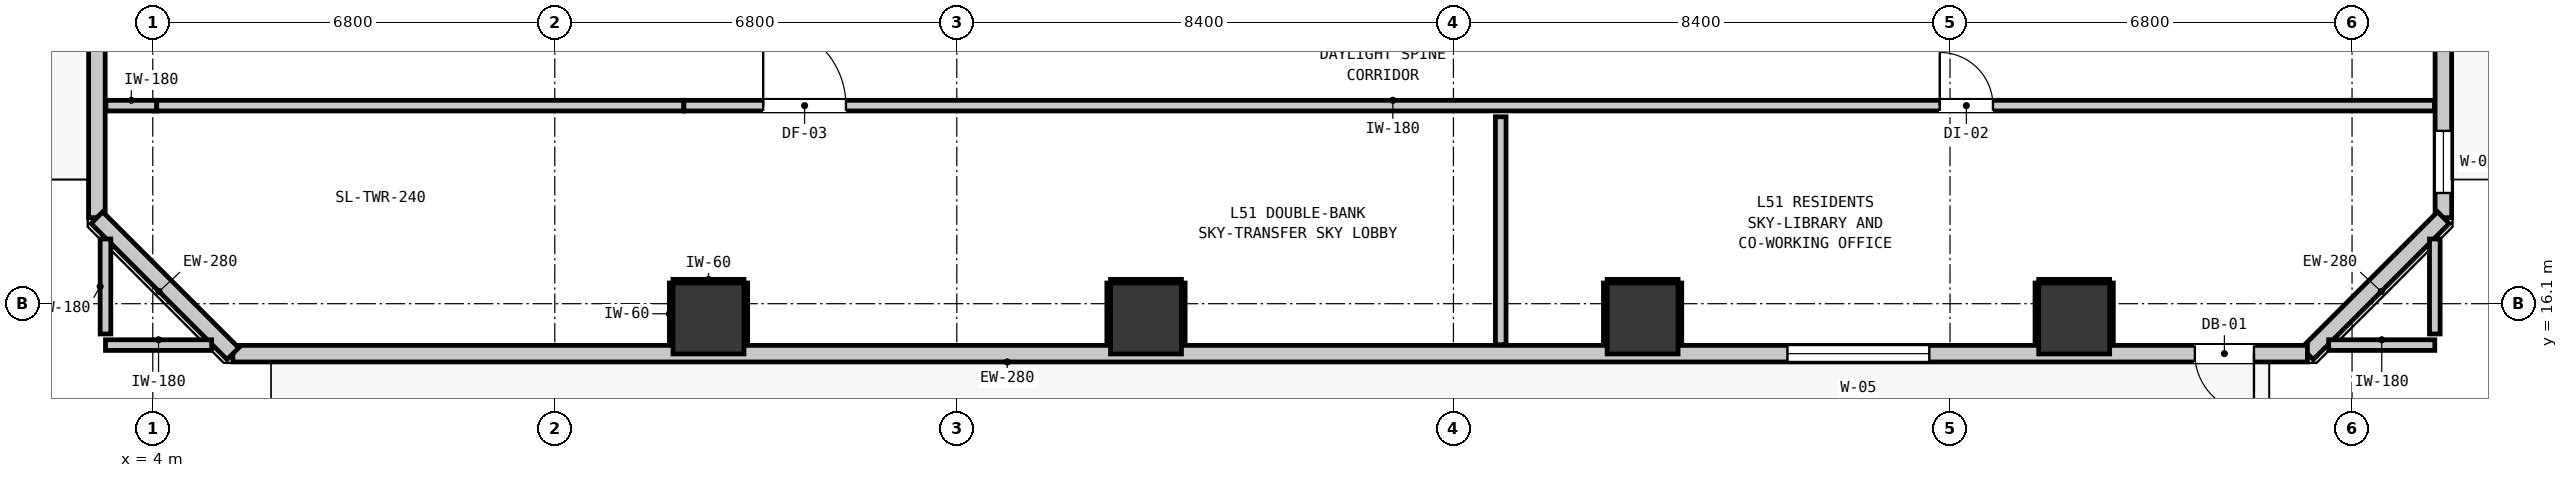
"""IFC4 building model, lengths in metres.
Left out: names, types, materials, properties, quantities, classifications, styles, units other than length and angle.
Written with IfcOpenShell. Run it as: python <this file> out.ifc"""

import sys

from ifc_helpers import new_model, si_unit, direction, frame, frame_2d, origin, origin_2d, place, context, subcontext, project, spatial, rectangle, extrude, element, fill, save


model = new_model("IFC4")
c1 = context("Model", 3, precision=1e-05, world=origin(), true_north=direction((0.0, 1.0)))
c2 = subcontext(c1, "Body", "Model", "MODEL_VIEW")
j1 = project(units=[si_unit("LENGTHUNIT", "METRE"), si_unit("PLANEANGLEUNIT", "RADIAN")], contexts=[c1])
p1 = place(None, origin())
s1 = spatial("IfcSite", under=j1, at=p1, CompositionType="ELEMENT")
p2 = place(p1, origin())
s2 = spatial("IfcBuilding", under=s1, at=p2, CompositionType="ELEMENT")
p3 = place(p2, frame((0.0, 0.0, 176.88)))
s3 = spatial("IfcBuildingStorey", under=s2, at=p3, CompositionType="ELEMENT", Elevation=176.88)
for number, where, z_axis, x_axis in (
    (1, (13.4, 15.85, 0.0), (0.0, 0.0, 1.0), (1.0, 0.0, 0.0)),
    (2, (20.8, 15.85, 0.0), (0.0, 0.0, 1.0), (1.0, 0.0, 0.0)),
    (3, (29.2, 15.85, 0.0), (0.0, 0.0, 1.0), (1.0, 0.0, 0.0)),
    (4, (36.5, 15.85, 0.0), (0.0, 0.0, 1.0), (1.0, 0.0, 0.0)),
):
    element("IfcColumn", number, at=place(p3, frame(where, z_axis=z_axis, x_axis=x_axis)), inside=s3, PredefinedType="COLUMN", context=c2, shape_type="SweptSolid", body=[
        extrude(rectangle(XDim=1.2, YDim=1.2, at=origin_2d()), origin(), (0.0, 0.0, 1.0), 3.32),
    ])
p4 = place(p3, frame((3.055, 17.555, 0.0), z_axis=(0.0, 0.0, 1.0), x_axis=(0.0, 1.0, 0.0)))
e5 = element("IfcWall", 5, at=p4, inside=s3, PredefinedType="STANDARD", context=c2, shape_type="SweptSolid", body=[
    extrude(rectangle(XDim=32.29, YDim=0.28, at=frame_2d((16.145, 0.0))), origin(), (0.0, 0.0, 1.0), 3.08),
])
p5 = place(p4, frame((29.684, 0.0, 0.0)))
e6 = element("IfcOpeningElement", 6, at=p5, cuts=e5, PredefinedType="OPENING", context=c2, shape_type="SweptSolid", body=[
    extrude(rectangle(XDim=1.0, YDim=2.15, at=frame_2d((0.5, 1.075))), frame((0.0, 0.15, 0.0), z_axis=(0.0, -1.0, 0.0), x_axis=(1.0, 0.0, 0.0)), (0.0, 0.0, 1.0), 0.3),
])
p6 = place(p4, frame((31.092, 0.0, 0.85)))
e7 = element("IfcOpeningElement", 7, at=p6, cuts=e5, PredefinedType="OPENING", context=c2, shape_type="SweptSolid", body=[
    extrude(rectangle(XDim=0.9, YDim=1.5, at=frame_2d((0.45, 0.75))), frame((0.0, 0.15, 0.0), z_axis=(0.0, -1.0, 0.0), x_axis=(1.0, 0.0, 0.0)), (0.0, 0.0, 1.0), 0.3),
])
p7 = place(p3, frame((42.745, 49.845, 0.0), z_axis=(0.0, 0.0, 1.0), x_axis=(0.0, -1.0, 0.0)))
e8 = element("IfcWall", 8, at=p7, inside=s3, PredefinedType="STANDARD", context=c2, shape_type="SweptSolid", body=[
    extrude(rectangle(XDim=32.29, YDim=0.28, at=frame_2d((16.145, 0.0))), origin(), (0.0, 0.0, 1.0), 3.08),
])
p8 = place(p7, frame((0.904, 0.0, 0.0)))
e9 = element("IfcOpeningElement", 9, at=p8, cuts=e8, PredefinedType="OPENING", context=c2, shape_type="SweptSolid", body=[
    extrude(rectangle(XDim=1.0, YDim=2.15, at=frame_2d((0.5, 1.075))), frame((0.0, 0.15, 0.0), z_axis=(0.0, -1.0, 0.0), x_axis=(1.0, 0.0, 0.0)), (0.0, 0.0, 1.0), 0.3),
])
p9 = place(p7, frame((30.822, 0.0, 0.85)))
e10 = element("IfcOpeningElement", 10, at=p9, cuts=e8, PredefinedType="OPENING", context=c2, shape_type="SweptSolid", body=[
    extrude(rectangle(XDim=1.05, YDim=1.65, at=frame_2d((0.525, 0.825))), frame((0.0, 0.15, 0.0), z_axis=(0.0, -1.0, 0.0), x_axis=(1.0, 0.0, 0.0)), (0.0, 0.0, 1.0), 0.3),
])
p10 = place(p7, frame((13.595, 0.0, 0.85)))
e11 = element("IfcOpeningElement", 11, at=p10, cuts=e8, PredefinedType="OPENING", context=c2, shape_type="SweptSolid", body=[
    extrude(rectangle(XDim=2.4, YDim=1.95, at=frame_2d((1.2, 0.975))), frame((0.0, 0.15, 0.0), z_axis=(0.0, -1.0, 0.0), x_axis=(1.0, 0.0, 0.0)), (0.0, 0.0, 1.0), 0.3),
])
p11 = place(p3, frame((42.745, 17.555, 0.0), z_axis=(0.0, 0.0, 1.0), x_axis=(-0.707106781187, -0.707106781187, 0.0)))
e12 = element("IfcWall", 12, at=p11, inside=s3, PredefinedType="STANDARD", context=c2, shape_type="SweptSolid", body=[
    extrude(rectangle(XDim=3.253, YDim=0.28, at=frame_2d((1.626, 0.0))), origin(), (0.0, 0.0, 1.0), 3.08),
])
p12 = place(p3, frame((40.445, 15.255, 0.0), z_axis=(0.0, 0.0, 1.0), x_axis=(-1.0, 0.0, 0.0)))
e13 = element("IfcWall", 13, at=p12, inside=s3, PredefinedType="STANDARD", context=c2, shape_type="SweptSolid", body=[
    extrude(rectangle(XDim=35.09, YDim=0.28, at=frame_2d((17.545, 0.0))), origin(), (0.0, 0.0, 1.0), 3.08),
])
p13 = place(p12, frame((0.904, 0.0, 0.0)))
e14 = element("IfcOpeningElement", 14, at=p13, cuts=e13, PredefinedType="OPENING", context=c2, shape_type="SweptSolid", body=[
    extrude(rectangle(XDim=1.0, YDim=2.15, at=frame_2d((0.5, 1.075))), frame((0.0, 0.15, 0.0), z_axis=(0.0, -1.0, 0.0), x_axis=(1.0, 0.0, 0.0)), (0.0, 0.0, 1.0), 0.3),
])
p14 = place(p12, frame((6.395, 0.0, 0.85)))
e15 = element("IfcOpeningElement", 15, at=p14, cuts=e13, PredefinedType="OPENING", context=c2, shape_type="SweptSolid", body=[
    extrude(rectangle(XDim=2.4, YDim=1.95, at=frame_2d((1.2, 0.975))), frame((0.0, 0.15, 0.0), z_axis=(0.0, -1.0, 0.0), x_axis=(1.0, 0.0, 0.0)), (0.0, 0.0, 1.0), 0.3),
])
p15 = place(p3, frame((5.355, 15.255, 0.0), z_axis=(0.0, 0.0, 1.0), x_axis=(-0.707106781187, 0.707106781187, 0.0)))
e16 = element("IfcWall", 16, at=p15, inside=s3, PredefinedType="STANDARD", context=c2, shape_type="SweptSolid", body=[
    extrude(rectangle(XDim=3.253, YDim=0.28, at=frame_2d((1.626, 0.0))), origin(), (0.0, 0.0, 1.0), 3.08),
])
for number, where, z_axis, x_axis in (
    (17, (3.2, 15.4, 0.0), (0.0, 0.0, 1.0), (1.0, 0.0, 0.0)),
    (18, (40.805, 15.4, 0.0), (0.0, 0.0, 1.0), (1.0, 0.0, 0.0)),
):
    element("IfcWall", number, at=place(p3, frame(where, z_axis=z_axis, x_axis=x_axis)), inside=s3, PredefinedType="PARTITIONING", context=c2, shape_type="SweptSolid", body=[
        extrude(rectangle(XDim=1.795, YDim=0.18, at=frame_2d((0.897, 0.0))), origin(), (0.0, 0.0, 1.0), 3.08),
    ])
p16 = place(p3, frame((3.207, 19.45, 0.0), z_axis=(0.0, 0.0, 1.0), x_axis=(1.0, 0.0, 0.0)))
e19 = element("IfcWall", 19, at=p16, inside=s3, PredefinedType="PARTITIONING", context=c2, shape_type="SweptSolid", body=[
    extrude(rectangle(XDim=0.86, YDim=0.18, at=frame_2d((0.43, 0.0))), origin(), (0.0, 0.0, 1.0), 3.08),
])
p17 = place(p3, frame((4.067, 19.45, 0.0), z_axis=(0.0, 0.0, 1.0), x_axis=(1.0, 0.0, 0.0)))
e20 = element("IfcWall", 20, at=p17, inside=s3, PredefinedType="PARTITIONING", context=c2, shape_type="SweptSolid", body=[
    extrude(rectangle(XDim=8.916, YDim=0.18, at=frame_2d((4.458, 0.0))), origin(), (0.0, 0.0, 1.0), 2.565),
])
p18 = place(p3, frame((12.983, 19.45, 0.0), z_axis=(0.0, 0.0, 1.0), x_axis=(1.0, 0.0, 0.0)))
e21 = element("IfcWall", 21, at=p18, inside=s3, PredefinedType="PARTITIONING", context=c2, shape_type="SweptSolid", body=[
    extrude(rectangle(XDim=29.61, YDim=0.18, at=frame_2d((14.805, 0.0))), origin(), (0.0, 0.0, 1.0), 3.08),
])
p19 = place(p18, frame((1.342, 0.0, 0.0)))
e22 = element("IfcOpeningElement", 22, at=p19, cuts=e21, PredefinedType="OPENING", context=c2, shape_type="SweptSolid", body=[
    extrude(rectangle(XDim=1.4, YDim=2.15, at=frame_2d((0.7, 1.075))), frame((0.0, 0.1, 0.0), z_axis=(0.0, -1.0, 0.0), x_axis=(1.0, 0.0, 0.0)), (0.0, 0.0, 1.0), 0.2),
])
p20 = place(p18, frame((21.243, 0.0, 0.0)))
e23 = element("IfcOpeningElement", 23, at=p20, cuts=e21, PredefinedType="OPENING", context=c2, shape_type="SweptSolid", body=[
    extrude(rectangle(XDim=0.9, YDim=2.1, at=frame_2d((0.45, 1.05))), frame((0.0, 0.1, 0.0), z_axis=(0.0, -1.0, 0.0), x_axis=(1.0, 0.0, 0.0)), (0.0, 0.0, 1.0), 0.2),
])
p21 = place(p3, frame((3.2, 15.588, 0.0), z_axis=(0.0, 0.0, 1.0), x_axis=(0.0, 1.0, 0.0)))
e24 = element("IfcWall", 24, at=p21, inside=s3, PredefinedType="PARTITIONING", context=c2, shape_type="SweptSolid", body=[
    extrude(rectangle(XDim=1.607, YDim=0.18, at=frame_2d((0.804, 0.0))), origin(), (0.0, 0.0, 1.0), 3.08),
])
p22 = place(p3, frame((26.8, 15.407, 0.0), z_axis=(0.0, 0.0, 1.0), x_axis=(0.0, 1.0, 0.0)))
e25 = element("IfcWall", 25, at=p22, inside=s3, PredefinedType="PARTITIONING", context=c2, shape_type="SweptSolid", body=[
    extrude(rectangle(XDim=3.855, YDim=0.18, at=frame_2d((1.927, 0.0))), origin(), (0.0, 0.0, 1.0), 3.08),
])
p23 = place(p3, frame((42.6, 15.588, 0.0), z_axis=(0.0, 0.0, 1.0), x_axis=(0.0, 1.0, 0.0)))
e26 = element("IfcWall", 26, at=p23, inside=s3, PredefinedType="PARTITIONING", context=c2, shape_type="SweptSolid", body=[
    extrude(rectangle(XDim=1.607, YDim=0.18, at=frame_2d((0.804, 0.0))), origin(), (0.0, 0.0, 1.0), 3.08),
])
p24 = place(p3, frame((12.8, 16.482, 0.0), z_axis=(0.0, 0.0, 1.0), x_axis=(1.0, 0.0, 0.0)))
e27 = element("IfcWall", 27, at=p24, inside=s3, PredefinedType="PARTITIONING", context=c2, shape_type="SweptSolid", body=[
    extrude(rectangle(XDim=1.2, YDim=0.06, at=frame_2d((0.6, 0.0))), origin(), (0.0, 0.0, 1.0), 1.45),
])
for number, where, z_axis, x_axis in (
    (28, (12.768, 15.41, 0.0), (0.0, 0.0, 1.0), (0.0, 1.0, 0.0)),
    (29, (14.032, 15.41, 0.0), (0.0, 0.0, 1.0), (0.0, 1.0, 0.0)),
):
    element("IfcWall", number, at=place(p3, frame(where, z_axis=z_axis, x_axis=x_axis)), inside=s3, PredefinedType="PARTITIONING", context=c2, shape_type="SweptSolid", body=[
        extrude(rectangle(XDim=1.04, YDim=0.06, at=frame_2d((0.52, 0.0))), origin(), (0.0, 0.0, 1.0), 1.45),
    ])
p25 = place(p3, frame((20.2, 16.482, 0.0), z_axis=(0.0, 0.0, 1.0), x_axis=(1.0, 0.0, 0.0)))
e30 = element("IfcWall", 30, at=p25, inside=s3, PredefinedType="PARTITIONING", context=c2, shape_type="SweptSolid", body=[
    extrude(rectangle(XDim=1.2, YDim=0.06, at=frame_2d((0.6, 0.0))), origin(), (0.0, 0.0, 1.0), 1.45),
])
for number, where, z_axis, x_axis in (
    (31, (20.168, 15.41, 0.0), (0.0, 0.0, 1.0), (0.0, 1.0, 0.0)),
    (32, (21.432, 15.41, 0.0), (0.0, 0.0, 1.0), (0.0, 1.0, 0.0)),
):
    element("IfcWall", number, at=place(p3, frame(where, z_axis=z_axis, x_axis=x_axis)), inside=s3, PredefinedType="PARTITIONING", context=c2, shape_type="SweptSolid", body=[
        extrude(rectangle(XDim=1.04, YDim=0.06, at=frame_2d((0.52, 0.0))), origin(), (0.0, 0.0, 1.0), 1.45),
    ])
p26 = place(p3, frame((28.6, 16.482, 0.0), z_axis=(0.0, 0.0, 1.0), x_axis=(1.0, 0.0, 0.0)))
e33 = element("IfcWall", 33, at=p26, inside=s3, PredefinedType="PARTITIONING", context=c2, shape_type="SweptSolid", body=[
    extrude(rectangle(XDim=1.2, YDim=0.06, at=frame_2d((0.6, 0.0))), origin(), (0.0, 0.0, 1.0), 1.45),
])
for number, where, z_axis, x_axis in (
    (34, (28.568, 15.41, 0.0), (0.0, 0.0, 1.0), (0.0, 1.0, 0.0)),
    (35, (29.832, 15.41, 0.0), (0.0, 0.0, 1.0), (0.0, 1.0, 0.0)),
):
    element("IfcWall", number, at=place(p3, frame(where, z_axis=z_axis, x_axis=x_axis)), inside=s3, PredefinedType="PARTITIONING", context=c2, shape_type="SweptSolid", body=[
        extrude(rectangle(XDim=1.04, YDim=0.06, at=frame_2d((0.52, 0.0))), origin(), (0.0, 0.0, 1.0), 1.45),
    ])
p27 = place(p3, frame((35.9, 16.482, 0.0), z_axis=(0.0, 0.0, 1.0), x_axis=(1.0, 0.0, 0.0)))
e36 = element("IfcWall", 36, at=p27, inside=s3, PredefinedType="PARTITIONING", context=c2, shape_type="SweptSolid", body=[
    extrude(rectangle(XDim=1.2, YDim=0.06, at=frame_2d((0.6, 0.0))), origin(), (0.0, 0.0, 1.0), 1.45),
])
for number, where, z_axis, x_axis in (
    (37, (35.868, 15.41, 0.0), (0.0, 0.0, 1.0), (0.0, 1.0, 0.0)),
    (38, (37.132, 15.41, 0.0), (0.0, 0.0, 1.0), (0.0, 1.0, 0.0)),
):
    element("IfcWall", number, at=place(p3, frame(where, z_axis=z_axis, x_axis=x_axis)), inside=s3, PredefinedType="PARTITIONING", context=c2, shape_type="SweptSolid", body=[
        extrude(rectangle(XDim=1.04, YDim=0.06, at=frame_2d((0.52, 0.0))), origin(), (0.0, 0.0, 1.0), 1.45),
    ])
p28 = place(p13, origin())
e39 = element("IfcDoor", 39, at=p28, inside=s3, OperationType="SINGLE_SWING_LEFT", PredefinedType="DOOR", context=c2, shape_type="SweptSolid", body=[
    extrude(rectangle(XDim=1.0, YDim=2.15, at=frame_2d((0.5, 1.075))), frame((0.0, 0.025, 0.0), z_axis=(0.0, -1.0, 0.0), x_axis=(1.0, 0.0, 0.0)), (0.0, 0.0, 1.0), 0.05),
])
fill(e14, e39)
p29 = place(p9, origin())
e40 = element("IfcWindow", 40, at=p29, inside=s3, PartitioningType="SINGLE_PANEL", PredefinedType="WINDOW", context=c2, shape_type="SweptSolid", body=[
    extrude(rectangle(XDim=1.05, YDim=1.65, at=frame_2d((0.525, 0.825))), frame((0.0, 0.03, 0.0), z_axis=(0.0, -1.0, 0.0), x_axis=(1.0, 0.0, 0.0)), (0.0, 0.0, 1.0), 0.06),
])
fill(e10, e40)
p30 = place(p14, origin())
e41 = element("IfcWindow", 41, at=p30, inside=s3, PartitioningType="SINGLE_PANEL", PredefinedType="WINDOW", context=c2, shape_type="SweptSolid", body=[
    extrude(rectangle(XDim=2.4, YDim=1.95, at=frame_2d((1.2, 0.975))), frame((0.0, 0.03, 0.0), z_axis=(0.0, -1.0, 0.0), x_axis=(1.0, 0.0, 0.0)), (0.0, 0.0, 1.0), 0.06),
])
fill(e15, e41)
p31 = place(p19, origin())
e42 = element("IfcDoor", 42, at=p31, inside=s3, OperationType="SINGLE_SWING_LEFT", PredefinedType="DOOR", context=c2, shape_type="SweptSolid", body=[
    extrude(rectangle(XDim=1.4, YDim=2.15, at=frame_2d((0.7, 1.075))), frame((0.0, 0.025, 0.0), z_axis=(0.0, -1.0, 0.0), x_axis=(1.0, 0.0, 0.0)), (0.0, 0.0, 1.0), 0.05),
])
fill(e22, e42)
p32 = place(p20, origin())
e43 = element("IfcDoor", 43, at=p32, inside=s3, OperationType="SINGLE_SWING_LEFT", PredefinedType="DOOR", context=c2, shape_type="SweptSolid", body=[
    extrude(rectangle(XDim=0.9, YDim=2.1, at=frame_2d((0.45, 1.05))), frame((0.0, 0.025, 0.0), z_axis=(0.0, -1.0, 0.0), x_axis=(1.0, 0.0, 0.0)), (0.0, 0.0, 1.0), 0.05),
])
fill(e23, e43)
save(model, sys.argv[1])
